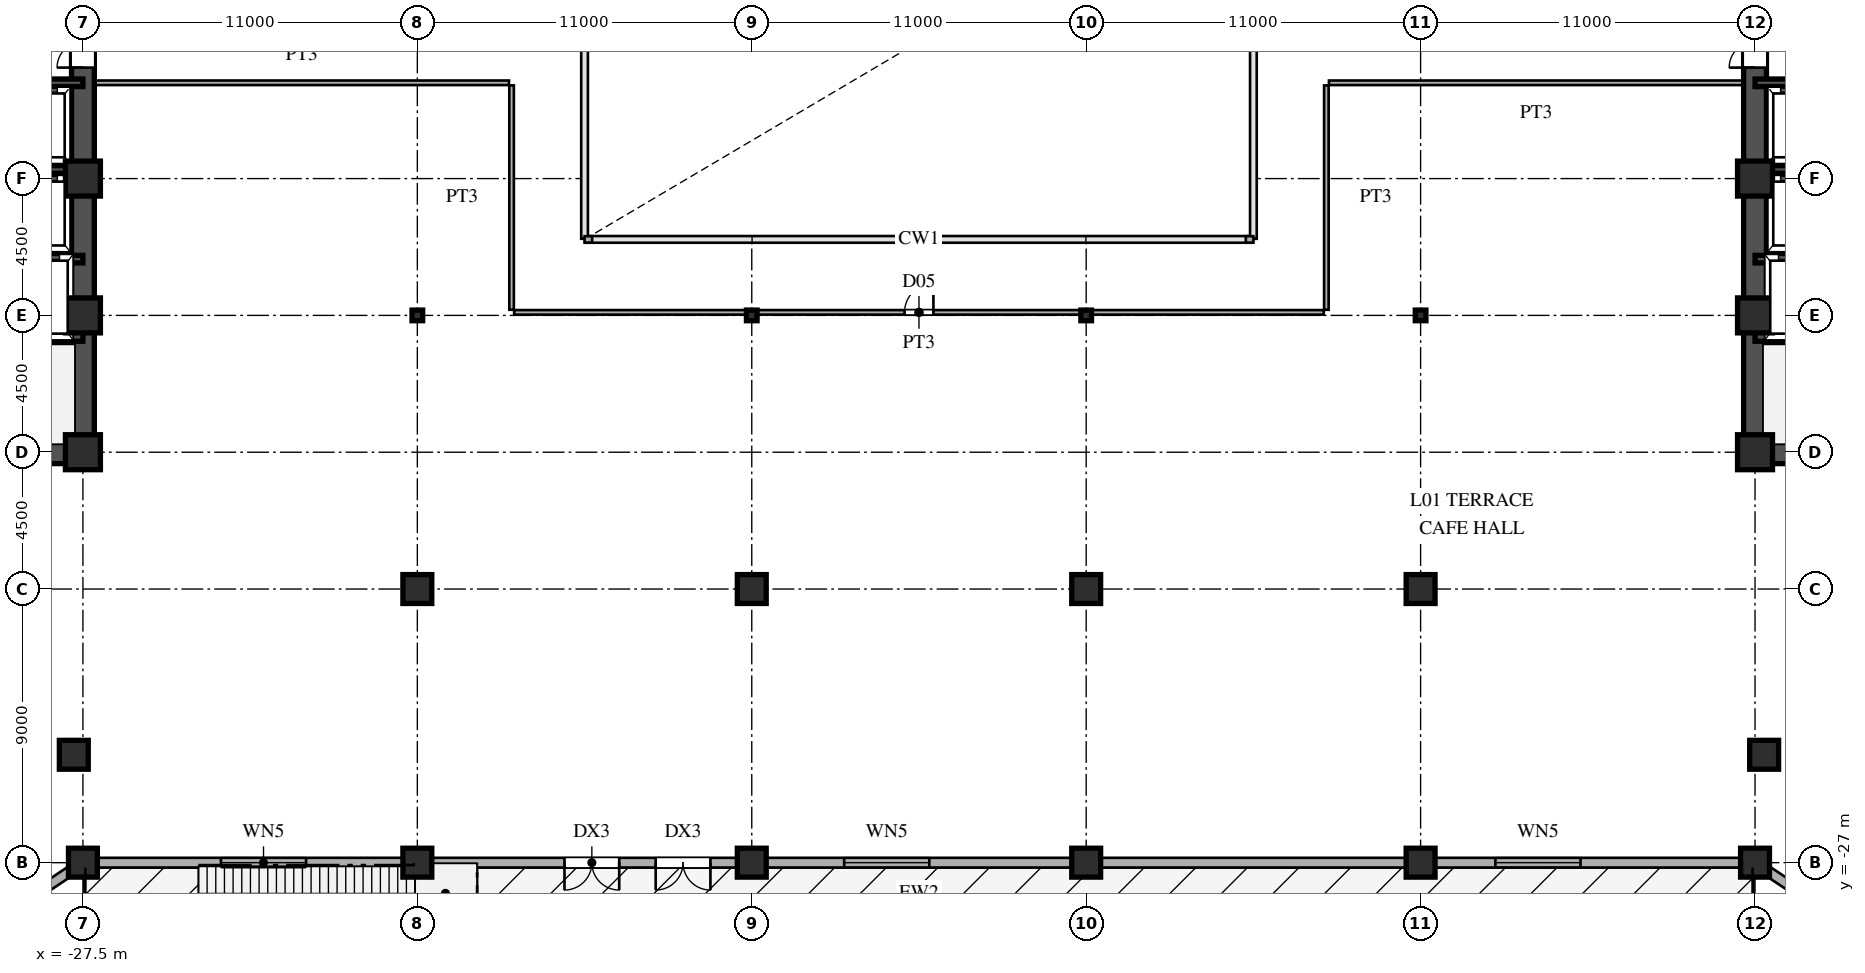
"""IFC4 building model, lengths in metres.
Left out: names, types, materials, properties, quantities, classifications, styles, units other than length and angle.
Written with IfcOpenShell. Run it as: python <this file> out.ifc"""

import sys

from ifc_helpers import new_model, si_unit, direction, frame, frame_2d, origin, origin_2d, place, context, subcontext, project, spatial, rectangle, hollow_rectangle, i_section, extrude, source, transform, mapped, element, fill, save


model = new_model("IFC4")
c1 = context("Model", 3, precision=1e-05, world=origin(), true_north=direction((0.0, 1.0)))
c2 = subcontext(c1, "Body", "Model", "MODEL_VIEW")
j1 = project(units=[si_unit("LENGTHUNIT", "METRE"), si_unit("PLANEANGLEUNIT", "RADIAN")], contexts=[c1])
p1 = place(None, origin())
s1 = spatial("IfcSite", under=j1, at=p1, CompositionType="ELEMENT")
p2 = place(p1, origin())
s2 = spatial("IfcBuilding", under=s1, at=p2, CompositionType="ELEMENT")
p3 = place(p2, frame((0.0, 0.0, 5.4)))
s3 = spatial("IfcBuildingStorey", under=s2, at=p3, CompositionType="ELEMENT", Elevation=5.4)
m1 = source(origin(), c2, "Body", "SweptSolid", [
    extrude(hollow_rectangle(XDim=1.15, YDim=1.15, WallThickness=0.048, at=origin_2d()), origin(), (0.0, 0.0, 1.0), 4.5),
])
for number, where, z_axis, x_axis in (
    (1, (-27.5, -13.5, 0.0), (0.0, 0.0, 1.0), (1.0, 0.0, 0.0)),
    (2, (-27.5, -9.0, 0.0), (0.0, 0.0, 1.0), (1.0, 0.0, 0.0)),
    (3, (-27.5, -4.5, 0.0), (0.0, 0.0, 1.0), (1.0, 0.0, 0.0)),
):
    element("IfcColumn", number, at=place(p3, frame(where, z_axis=z_axis, x_axis=x_axis)), inside=s3, PredefinedType="COLUMN", context=c2, shape_type="MappedRepresentation", body=[
        mapped(m1, transform((0.0, 0.0, 0.0), scale=1.0)),
    ])
m2 = source(origin(), c2, "Body", "SweptSolid", [
    extrude(rectangle(XDim=0.95, YDim=0.95, at=origin_2d()), origin(), (0.0, 0.0, 1.0), 4.5),
])
for number, where, z_axis, x_axis in (
    (4, (-27.5, -27.0, 0.0), (0.0, 0.0, 1.0), (1.0, 0.0, 0.0)),
    (5, (-27.8, -23.451, 0.0), (0.0, 0.0, 1.0), (1.0, 0.0, 0.0)),
):
    element("IfcColumn", number, at=place(p3, frame(where, z_axis=z_axis, x_axis=x_axis)), inside=s3, PredefinedType="COLUMN", context=c2, shape_type="MappedRepresentation", body=[
        mapped(m2, transform((0.0, 0.0, 0.0), scale=1.0)),
    ])
for number, where, z_axis, x_axis in (
    (6, (27.5, -13.5, 0.0), (0.0, 0.0, 1.0), (1.0, 0.0, 0.0)),
    (7, (27.5, -9.0, 0.0), (0.0, 0.0, 1.0), (1.0, 0.0, 0.0)),
    (8, (27.5, -4.5, 0.0), (0.0, 0.0, 1.0), (1.0, 0.0, 0.0)),
):
    element("IfcColumn", number, at=place(p3, frame(where, z_axis=z_axis, x_axis=x_axis)), inside=s3, PredefinedType="COLUMN", context=c2, shape_type="MappedRepresentation", body=[
        mapped(m1, transform((0.0, 0.0, 0.0), scale=1.0)),
    ])
for number, where, z_axis, x_axis in (
    (9, (27.5, -27.0, 0.0), (0.0, 0.0, 1.0), (1.0, 0.0, 0.0)),
    (10, (27.8, -23.451, 0.0), (0.0, 0.0, 1.0), (1.0, 0.0, 0.0)),
    (11, (-16.5, -27.0, 0.0), (0.0, 0.0, 1.0), (1.0, 0.0, 0.0)),
    (12, (-16.5, -18.0, 0.0), (0.0, 0.0, 1.0), (1.0, 0.0, 0.0)),
):
    element("IfcColumn", number, at=place(p3, frame(where, z_axis=z_axis, x_axis=x_axis)), inside=s3, PredefinedType="COLUMN", context=c2, shape_type="MappedRepresentation", body=[
        mapped(m2, transform((0.0, 0.0, 0.0), scale=1.0)),
    ])
m3 = source(origin(), c2, "Body", "SweptSolid", [
    extrude(i_section(OverallWidth=0.35, OverallDepth=0.35, WebThickness=0.012, FlangeThickness=0.019, at=origin_2d()), origin(), (0.0, 0.0, 1.0), 4.5),
])
p4 = place(p3, frame((-16.5, -9.0, 0.0), z_axis=(0.0, 0.0, 1.0), x_axis=(1.0, 0.0, 0.0)))
e13 = element("IfcColumn", 13, at=p4, inside=s3, PredefinedType="COLUMN", context=c2, shape_type="MappedRepresentation", body=[
    mapped(m3, transform((0.0, 0.0, 0.0), scale=1.0)),
])
for number, where, z_axis, x_axis in (
    (14, (-5.5, -27.0, 0.0), (0.0, 0.0, 1.0), (1.0, 0.0, 0.0)),
    (15, (-5.5, -18.0, 0.0), (0.0, 0.0, 1.0), (1.0, 0.0, 0.0)),
):
    element("IfcColumn", number, at=place(p3, frame(where, z_axis=z_axis, x_axis=x_axis)), inside=s3, PredefinedType="COLUMN", context=c2, shape_type="MappedRepresentation", body=[
        mapped(m2, transform((0.0, 0.0, 0.0), scale=1.0)),
    ])
p5 = place(p3, frame((-5.5, -9.0, 0.0), z_axis=(0.0, 0.0, 1.0), x_axis=(1.0, 0.0, 0.0)))
e16 = element("IfcColumn", 16, at=p5, inside=s3, PredefinedType="COLUMN", context=c2, shape_type="MappedRepresentation", body=[
    mapped(m3, transform((0.0, 0.0, 0.0), scale=1.0)),
])
for number, where, z_axis, x_axis in (
    (17, (5.5, -27.0, 0.0), (0.0, 0.0, 1.0), (1.0, 0.0, 0.0)),
    (18, (5.5, -18.0, 0.0), (0.0, 0.0, 1.0), (1.0, 0.0, 0.0)),
):
    element("IfcColumn", number, at=place(p3, frame(where, z_axis=z_axis, x_axis=x_axis)), inside=s3, PredefinedType="COLUMN", context=c2, shape_type="MappedRepresentation", body=[
        mapped(m2, transform((0.0, 0.0, 0.0), scale=1.0)),
    ])
p6 = place(p3, frame((5.5, -9.0, 0.0), z_axis=(0.0, 0.0, 1.0), x_axis=(1.0, 0.0, 0.0)))
e19 = element("IfcColumn", 19, at=p6, inside=s3, PredefinedType="COLUMN", context=c2, shape_type="MappedRepresentation", body=[
    mapped(m3, transform((0.0, 0.0, 0.0), scale=1.0)),
])
for number, where, z_axis, x_axis in (
    (20, (16.5, -27.0, 0.0), (0.0, 0.0, 1.0), (1.0, 0.0, 0.0)),
    (21, (16.5, -18.0, 0.0), (0.0, 0.0, 1.0), (1.0, 0.0, 0.0)),
):
    element("IfcColumn", number, at=place(p3, frame(where, z_axis=z_axis, x_axis=x_axis)), inside=s3, PredefinedType="COLUMN", context=c2, shape_type="MappedRepresentation", body=[
        mapped(m2, transform((0.0, 0.0, 0.0), scale=1.0)),
    ])
p7 = place(p3, frame((16.5, -9.0, 0.0), z_axis=(0.0, 0.0, 1.0), x_axis=(1.0, 0.0, 0.0)))
e22 = element("IfcColumn", 22, at=p7, inside=s3, PredefinedType="COLUMN", context=c2, shape_type="MappedRepresentation", body=[
    mapped(m3, transform((0.0, 0.0, 0.0), scale=1.0)),
])
p8 = place(p3, frame((-30.467, -28.978, 0.0), z_axis=(0.0, 0.0, 1.0), x_axis=(0.832071600484, 0.554668235676, 0.0)))
e23 = element("IfcWall", 23, at=p8, inside=s3, PredefinedType="SOLIDWALL", context=c2, shape_type="SweptSolid", body=[
    extrude(rectangle(XDim=3.526, YDim=0.32, at=frame_2d((1.763, 0.0))), origin(), (0.0, 0.0, 1.0), 4.22),
])
p9 = place(p3, frame((-27.46, -27.0, 0.0), z_axis=(0.0, 0.0, 1.0), x_axis=(1.0, 0.0, 0.0)))
e24 = element("IfcWall", 24, at=p9, inside=s3, PredefinedType="SOLIDWALL", context=c2, shape_type="SweptSolid", body=[
    extrude(rectangle(XDim=54.92, YDim=0.32, at=frame_2d((27.46, 0.0))), origin(), (0.0, 0.0, 1.0), 3.42),
])
p10 = place(p9, frame((15.8, 0.0, 0.0)))
e25 = element("IfcOpeningElement", 25, at=p10, cuts=e24, PredefinedType="OPENING", context=c2, shape_type="SweptSolid", body=[
    extrude(rectangle(XDim=1.8, YDim=2.3, at=frame_2d((0.9, 1.15))), frame((0.0, 0.17, 0.0), z_axis=(0.0, -1.0, 0.0), x_axis=(1.0, 0.0, 0.0)), (0.0, 0.0, 1.0), 0.34),
])
p11 = place(p9, frame((18.8, 0.0, 0.0)))
e26 = element("IfcOpeningElement", 26, at=p11, cuts=e24, PredefinedType="OPENING", context=c2, shape_type="SweptSolid", body=[
    extrude(rectangle(XDim=1.8, YDim=2.3, at=frame_2d((0.9, 1.15))), frame((0.0, 0.17, 0.0), z_axis=(0.0, -1.0, 0.0), x_axis=(1.0, 0.0, 0.0)), (0.0, 0.0, 1.0), 0.34),
])
p12 = place(p9, frame((4.5, 0.0, 0.8)))
e27 = element("IfcOpeningElement", 27, at=p12, cuts=e24, PredefinedType="OPENING", context=c2, shape_type="SweptSolid", body=[
    extrude(rectangle(XDim=2.8, YDim=2.1, at=frame_2d((1.4, 1.05))), frame((0.0, 0.17, 0.0), z_axis=(0.0, -1.0, 0.0), x_axis=(1.0, 0.0, 0.0)), (0.0, 0.0, 1.0), 0.34),
])
p13 = place(p9, frame((25.0, 0.0, 0.8)))
e28 = element("IfcOpeningElement", 28, at=p13, cuts=e24, PredefinedType="OPENING", context=c2, shape_type="SweptSolid", body=[
    extrude(rectangle(XDim=2.8, YDim=2.1, at=frame_2d((1.4, 1.05))), frame((0.0, 0.17, 0.0), z_axis=(0.0, -1.0, 0.0), x_axis=(1.0, 0.0, 0.0)), (0.0, 0.0, 1.0), 0.34),
])
p14 = place(p9, frame((46.42, 0.0, 0.8)))
e29 = element("IfcOpeningElement", 29, at=p14, cuts=e24, PredefinedType="OPENING", context=c2, shape_type="SweptSolid", body=[
    extrude(rectangle(XDim=2.8, YDim=2.1, at=frame_2d((1.4, 1.05))), frame((0.0, 0.17, 0.0), z_axis=(0.0, -1.0, 0.0), x_axis=(1.0, 0.0, 0.0)), (0.0, 0.0, 1.0), 0.34),
])
p15 = place(p3, frame((27.533, -27.022, 0.0), z_axis=(0.0, 0.0, 1.0), x_axis=(0.832071600484, -0.554668235676, 0.0)))
e30 = element("IfcWall", 30, at=p15, inside=s3, PredefinedType="SOLIDWALL", context=c2, shape_type="SweptSolid", body=[
    extrude(rectangle(XDim=3.526, YDim=0.32, at=frame_2d((1.763, 0.0))), origin(), (0.0, 0.0, 1.0), 4.22),
])
for number, where, z_axis, x_axis in (
    (31, (-11.0, -6.5, 0.0), (0.0, 0.0, 1.0), (1.0, 0.0, 0.0)),
    (32, (11.0, -6.5, 0.0), (0.0, 0.0, 1.0), (-1.0, 0.0, 0.0)),
):
    element("IfcWall", number, at=place(p3, frame(where, z_axis=z_axis, x_axis=x_axis)), inside=s3, PredefinedType="SOLIDWALL", context=c2, shape_type="SweptSolid", body=[
        extrude(rectangle(XDim=0.25, YDim=0.21, at=frame_2d((0.125, 0.0))), origin(), (0.0, 0.0, 1.0), 4.22),
    ])
p16 = place(p3, frame((-27.5, -13.5, 0.0), z_axis=(0.0, 0.0, 1.0), x_axis=(0.0, 1.0, 0.0)))
e33 = element("IfcWall", 33, at=p16, inside=s3, PredefinedType="SHEAR", context=c2, shape_type="SweptSolid", body=[
    extrude(rectangle(XDim=12.2, YDim=0.75, at=frame_2d((6.1, 0.0))), origin(), (0.0, 0.0, 1.0), 4.22),
])
p17 = place(p3, frame((-27.5, -1.3, 0.0), z_axis=(0.0, 0.0, 1.0), x_axis=(0.0, 1.0, 0.0)))
e34 = element("IfcWall", 34, at=p17, inside=s3, PredefinedType="SHEAR", context=c2, shape_type="SweptSolid", body=[
    extrude(rectangle(XDim=2.6, YDim=0.75, at=frame_2d((1.3, 0.0))), origin(), (0.0, 0.0, 1.0), 4.22),
])
p18 = place(p17, frame((0.45, 0.0, 0.0)))
e35 = element("IfcOpeningElement", 35, at=p18, cuts=e34, PredefinedType="OPENING", context=c2, shape_type="SweptSolid", body=[
    extrude(rectangle(XDim=1.7, YDim=2.35, at=frame_2d((0.85, 1.175))), frame((0.0, 0.385, 0.0), z_axis=(0.0, -1.0, 0.0), x_axis=(1.0, 0.0, 0.0)), (0.0, 0.0, 1.0), 0.77),
])
p19 = place(p3, frame((-36.5, -13.5, 0.0), z_axis=(0.0, 0.0, 1.0), x_axis=(1.0, 0.0, 0.0)))
e36 = element("IfcWall", 36, at=p19, inside=s3, PredefinedType="SHEAR", context=c2, shape_type="SweptSolid", body=[
    extrude(rectangle(XDim=9.0, YDim=0.75, at=frame_2d((4.5, 0.0))), origin(), (0.0, 0.0, 1.0), 4.22),
])
p20 = place(p3, frame((-36.5, -9.7, 0.0), z_axis=(0.0, 0.0, 1.0), x_axis=(1.0, 0.0, 0.0)))
e37 = element("IfcWall", 37, at=p20, inside=s3, PredefinedType="SHEAR", context=c2, shape_type="SweptSolid", body=[
    extrude(rectangle(XDim=9.0, YDim=0.3, at=frame_2d((4.5, 0.0))), origin(), (0.0, 0.0, 1.0), 4.22),
])
p21 = place(p20, frame((0.6, 0.0, 0.0)))
e38 = element("IfcOpeningElement", 38, at=p21, cuts=e37, PredefinedType="OPENING", context=c2, shape_type="SweptSolid", body=[
    extrude(rectangle(XDim=1.1, YDim=2.2, at=frame_2d((0.55, 1.1))), frame((0.0, 0.16, 0.0), z_axis=(0.0, -1.0, 0.0), x_axis=(1.0, 0.0, 0.0)), (0.0, 0.0, 1.0), 0.32),
])
for number, where, z_axis, x_axis in (
    (39, (-30.3, -7.15, 0.0), (0.0, 0.0, 1.0), (1.0, 0.0, 0.0)),
    (40, (-30.3, -4.2, 0.0), (0.0, 0.0, 1.0), (1.0, 0.0, 0.0)),
    (41, (-30.3, -1.35, 0.0), (0.0, 0.0, 1.0), (1.0, 0.0, 0.0)),
):
    element("IfcWall", number, at=place(p3, frame(where, z_axis=z_axis, x_axis=x_axis)), inside=s3, PredefinedType="SHEAR", context=c2, shape_type="SweptSolid", body=[
        extrude(rectangle(XDim=2.8, YDim=0.25, at=frame_2d((1.4, 0.0))), origin(), (0.0, 0.0, 1.0), 4.22),
    ])
p22 = place(p3, frame((27.5, -13.5, 0.0), z_axis=(0.0, 0.0, 1.0), x_axis=(0.0, 1.0, 0.0)))
e42 = element("IfcWall", 42, at=p22, inside=s3, PredefinedType="SHEAR", context=c2, shape_type="SweptSolid", body=[
    extrude(rectangle(XDim=12.2, YDim=0.75, at=frame_2d((6.1, 0.0))), origin(), (0.0, 0.0, 1.0), 4.22),
])
p23 = place(p3, frame((27.5, -1.3, 0.0), z_axis=(0.0, 0.0, 1.0), x_axis=(0.0, 1.0, 0.0)))
e43 = element("IfcWall", 43, at=p23, inside=s3, PredefinedType="SHEAR", context=c2, shape_type="SweptSolid", body=[
    extrude(rectangle(XDim=2.6, YDim=0.75, at=frame_2d((1.3, 0.0))), origin(), (0.0, 0.0, 1.0), 4.22),
])
p24 = place(p23, frame((0.45, 0.0, 0.0)))
e44 = element("IfcOpeningElement", 44, at=p24, cuts=e43, PredefinedType="OPENING", context=c2, shape_type="SweptSolid", body=[
    extrude(rectangle(XDim=1.7, YDim=2.35, at=frame_2d((0.85, 1.175))), frame((0.0, 0.385, 0.0), z_axis=(0.0, -1.0, 0.0), x_axis=(1.0, 0.0, 0.0)), (0.0, 0.0, 1.0), 0.77),
])
p25 = place(p3, frame((27.5, -13.5, 0.0), z_axis=(0.0, 0.0, 1.0), x_axis=(1.0, 0.0, 0.0)))
e45 = element("IfcWall", 45, at=p25, inside=s3, PredefinedType="SHEAR", context=c2, shape_type="SweptSolid", body=[
    extrude(rectangle(XDim=9.0, YDim=0.75, at=frame_2d((4.5, 0.0))), origin(), (0.0, 0.0, 1.0), 4.22),
])
p26 = place(p3, frame((27.5, -9.7, 0.0), z_axis=(0.0, 0.0, 1.0), x_axis=(1.0, 0.0, 0.0)))
e46 = element("IfcWall", 46, at=p26, inside=s3, PredefinedType="SHEAR", context=c2, shape_type="SweptSolid", body=[
    extrude(rectangle(XDim=9.0, YDim=0.3, at=frame_2d((4.5, 0.0))), origin(), (0.0, 0.0, 1.0), 4.22),
])
p27 = place(p26, frame((7.3, 0.0, 0.0)))
e47 = element("IfcOpeningElement", 47, at=p27, cuts=e46, PredefinedType="OPENING", context=c2, shape_type="SweptSolid", body=[
    extrude(rectangle(XDim=1.1, YDim=2.2, at=frame_2d((0.55, 1.1))), frame((0.0, 0.16, 0.0), z_axis=(0.0, -1.0, 0.0), x_axis=(1.0, 0.0, 0.0)), (0.0, 0.0, 1.0), 0.32),
])
for number, where, z_axis, x_axis in (
    (48, (27.5, -7.15, 0.0), (0.0, 0.0, 1.0), (1.0, 0.0, 0.0)),
    (49, (27.5, -4.2, 0.0), (0.0, 0.0, 1.0), (1.0, 0.0, 0.0)),
    (50, (27.5, -1.35, 0.0), (0.0, 0.0, 1.0), (1.0, 0.0, 0.0)),
):
    element("IfcWall", number, at=place(p3, frame(where, z_axis=z_axis, x_axis=x_axis)), inside=s3, PredefinedType="SHEAR", context=c2, shape_type="SweptSolid", body=[
        extrude(rectangle(XDim=2.8, YDim=0.25, at=frame_2d((1.4, 0.0))), origin(), (0.0, 0.0, 1.0), 4.22),
    ])
p28 = place(p3, frame((-13.315, -8.9, 0.0), z_axis=(0.0, 0.0, 1.0), x_axis=(1.0, 0.0, 0.0)))
e51 = element("IfcWall", 51, at=p28, inside=s3, PredefinedType="PARTITIONING", context=c2, shape_type="SweptSolid", body=[
    extrude(rectangle(XDim=26.63, YDim=0.15, at=frame_2d((13.315, 0.0))), origin(), (0.0, 0.0, 1.0), 3.42),
])
p29 = place(p28, frame((12.84, 0.0, 0.0)))
e52 = element("IfcOpeningElement", 52, at=p29, cuts=e51, PredefinedType="OPENING", context=c2, shape_type="SweptSolid", body=[
    extrude(rectangle(XDim=0.95, YDim=2.15, at=frame_2d((0.475, 1.075))), frame((0.0, 0.085, 0.0), z_axis=(0.0, -1.0, 0.0), x_axis=(1.0, 0.0, 0.0)), (0.0, 0.0, 1.0), 0.17),
])
for number, where, z_axis, x_axis in (
    (53, (-27.12, -1.35, 0.0), (0.0, 0.0, 1.0), (1.0, 0.0, 0.0)),
    (54, (13.485, -1.35, 0.0), (0.0, 0.0, 1.0), (1.0, 0.0, 0.0)),
):
    element("IfcWall", number, at=place(p3, frame(where, z_axis=z_axis, x_axis=x_axis)), inside=s3, PredefinedType="PARTITIONING", context=c2, shape_type="SweptSolid", body=[
        extrude(rectangle(XDim=13.635, YDim=0.15, at=frame_2d((6.817, 0.0))), origin(), (0.0, 0.0, 1.0), 4.22),
    ])
for number, where, z_axis, x_axis in (
    (55, (-13.4, -8.815, 0.0), (0.0, 0.0, 1.0), (0.0, 1.0, 0.0)),
    (56, (13.4, -8.815, 0.0), (0.0, 0.0, 1.0), (0.0, 1.0, 0.0)),
):
    element("IfcWall", number, at=place(p3, frame(where, z_axis=z_axis, x_axis=x_axis)), inside=s3, PredefinedType="PARTITIONING", context=c2, shape_type="SweptSolid", body=[
        extrude(rectangle(XDim=7.38, YDim=0.15, at=frame_2d((3.69, 0.0))), origin(), (0.0, 0.0, 1.0), 4.22),
    ])
m4 = source(origin(), c2, "Body", "SweptSolid", [
    extrude(rectangle(XDim=1.8, YDim=2.3, at=frame_2d((0.9, 1.15))), frame((0.0, 0.025, 0.0), z_axis=(0.0, -1.0, 0.0), x_axis=(1.0, 0.0, 0.0)), (0.0, 0.0, 1.0), 0.05),
])
p30 = place(p10, frame((1.8, 0.0, 0.0), z_axis=(0.0, 0.0, 1.0), x_axis=(-1.0, 0.0, 0.0)))
e57 = element("IfcDoor", 57, at=p30, inside=s3, OperationType="DOUBLE_SWING_LEFT", PredefinedType="DOOR", context=c2, shape_type="MappedRepresentation", body=[
    mapped(m4, transform((0.0, 0.0, 0.0), scale=1.0)),
])
fill(e25, e57)
p31 = place(p11, frame((1.8, 0.0, 0.0), z_axis=(0.0, 0.0, 1.0), x_axis=(-1.0, 0.0, 0.0)))
e58 = element("IfcDoor", 58, at=p31, inside=s3, OperationType="DOUBLE_SWING_LEFT", PredefinedType="DOOR", context=c2, shape_type="MappedRepresentation", body=[
    mapped(m4, transform((0.0, 0.0, 0.0), scale=1.0)),
])
fill(e26, e58)
m5 = source(origin(), c2, "Body", "SweptSolid", [
    extrude(rectangle(XDim=2.8, YDim=2.1, at=frame_2d((1.4, 1.05))), frame((0.0, 0.03, 0.0), z_axis=(0.0, -1.0, 0.0), x_axis=(1.0, 0.0, 0.0)), (0.0, 0.0, 1.0), 0.06),
])
p32 = place(p12, origin())
e59 = element("IfcWindow", 59, at=p32, inside=s3, PartitioningType="SINGLE_PANEL", PredefinedType="WINDOW", context=c2, shape_type="MappedRepresentation", body=[
    mapped(m5, transform((0.0, 0.0, 0.0), scale=1.0)),
])
fill(e27, e59)
p33 = place(p13, origin())
e60 = element("IfcWindow", 60, at=p33, inside=s3, PartitioningType="SINGLE_PANEL", PredefinedType="WINDOW", context=c2, shape_type="MappedRepresentation", body=[
    mapped(m5, transform((0.0, 0.0, 0.0), scale=1.0)),
])
fill(e28, e60)
p34 = place(p14, origin())
e61 = element("IfcWindow", 61, at=p34, inside=s3, PartitioningType="SINGLE_PANEL", PredefinedType="WINDOW", context=c2, shape_type="MappedRepresentation", body=[
    mapped(m5, transform((0.0, 0.0, 0.0), scale=1.0)),
])
fill(e29, e61)
m6 = source(origin(), c2, "Body", "SweptSolid", [
    extrude(rectangle(XDim=1.7, YDim=2.35, at=frame_2d((0.85, 1.175))), frame((0.0, 0.025, 0.0), z_axis=(0.0, -1.0, 0.0), x_axis=(1.0, 0.0, 0.0)), (0.0, 0.0, 1.0), 0.05),
])
p35 = place(p18, origin())
e62 = element("IfcDoor", 62, at=p35, inside=s3, OperationType="DOUBLE_SWING_LEFT", PredefinedType="DOOR", context=c2, shape_type="MappedRepresentation", body=[
    mapped(m6, transform((0.0, 0.0, 0.0), scale=1.0)),
])
fill(e35, e62)
p36 = place(p24, origin())
e63 = element("IfcDoor", 63, at=p36, inside=s3, OperationType="DOUBLE_SWING_LEFT", PredefinedType="DOOR", context=c2, shape_type="MappedRepresentation", body=[
    mapped(m6, transform((0.0, 0.0, 0.0), scale=1.0)),
])
fill(e44, e63)
m7 = source(origin(), c2, "Body", "SweptSolid", [
    extrude(rectangle(XDim=0.95, YDim=2.15, at=frame_2d((0.475, 1.075))), frame((0.0, 0.025, 0.0), z_axis=(0.0, -1.0, 0.0), x_axis=(1.0, 0.0, 0.0)), (0.0, 0.0, 1.0), 0.05),
])
p37 = place(p29, origin())
e64 = element("IfcDoor", 64, at=p37, inside=s3, OperationType="SINGLE_SWING_RIGHT", PredefinedType="DOOR", context=c2, shape_type="MappedRepresentation", body=[
    mapped(m7, transform((0.0, 0.0, 0.0), scale=1.0)),
])
fill(e52, e64)
save(model, sys.argv[1])
